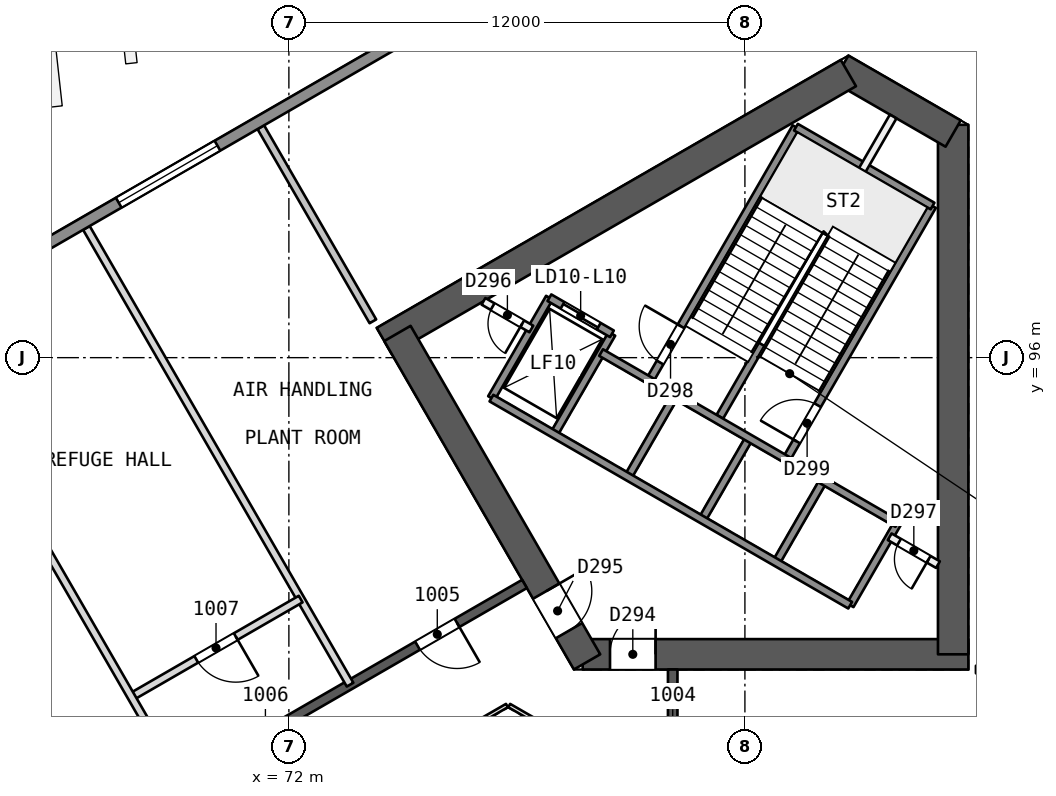
"""IFC4 building model, lengths in metres.
Left out: names, types, materials, properties, quantities, classifications, styles, units other than length and angle.
Written with IfcOpenShell. Run it as: python <this file> out.ifc"""

import sys

from ifc_helpers import new_model, si_unit, direction, frame, frame_2d, origin, place, context, subcontext, project, spatial, rectangle, extrude, element, fill, save


model = new_model("IFC4")
c1 = context("Model", 3, precision=1e-05, world=origin(), true_north=direction((0.0, 1.0)))
c2 = subcontext(c1, "Body", "Model", "MODEL_VIEW")
j1 = project(units=[si_unit("LENGTHUNIT", "METRE"), si_unit("PLANEANGLEUNIT", "RADIAN")], contexts=[c1])
p1 = place(None, origin())
s1 = spatial("IfcSite", under=j1, at=p1, CompositionType="ELEMENT")
p2 = place(p1, origin())
s2 = spatial("IfcBuilding", under=s1, at=p2, CompositionType="ELEMENT")
p3 = place(p2, frame((0.0, 0.0, 48.5)))
s3 = spatial("IfcBuildingStorey", under=s2, at=p3, CompositionType="ELEMENT", Elevation=48.5)
p4 = place(p3, frame((65.538, 80.0, 0.0), z_axis=(0.0, 0.0, 1.0), x_axis=(-0.49999662545, 0.866027352073, 0.0)))
e1 = element("IfcWall", 1, at=p4, inside=s3, PredefinedType="SHEAR", context=c2, shape_type="SweptSolid", body=[
    extrude(rectangle(XDim=10.149, YDim=0.8, at=frame_2d((5.074, 0.0))), origin(), (0.0, 0.0, 1.0), 4.4),
])
p5 = place(p4, frame((0.719, 0.0, 0.0)))
e2 = element("IfcOpeningElement", 2, at=p5, cuts=e1, PredefinedType="OPENING", context=c2, shape_type="SweptSolid", body=[
    extrude(rectangle(XDim=1.2, YDim=2.1, at=frame_2d((0.6, 1.05))), frame((0.0, 0.411, 0.0), z_axis=(0.0, -1.0, 0.0), x_axis=(1.0, 0.0, 0.0)), (0.0, 0.0, 1.0), 0.821),
])
p6 = place(p3, frame((79.731, 88.194, 0.0), z_axis=(0.0, 0.0, 1.0), x_axis=(1.0, 0.0, 0.0)))
e3 = element("IfcWall", 3, at=p6, inside=s3, PredefinedType="SHEAR", context=c2, shape_type="SweptSolid", body=[
    extrude(rectangle(XDim=10.149, YDim=0.8, at=frame_2d((5.074, 0.0))), origin(), (0.0, 0.0, 1.0), 4.4),
])
p7 = place(p6, frame((0.719, 0.0, 0.0)))
e4 = element("IfcOpeningElement", 4, at=p7, cuts=e3, PredefinedType="OPENING", context=c2, shape_type="SweptSolid", body=[
    extrude(rectangle(XDim=1.2, YDim=2.1, at=frame_2d((0.6, 1.05))), frame((0.0, 0.411, 0.0), z_axis=(0.0, -1.0, 0.0), x_axis=(1.0, 0.0, 0.0)), (0.0, 0.0, 1.0), 0.821),
])
p8 = place(p3, frame((89.48, 88.194, 0.0), z_axis=(0.0, 0.0, 1.0), x_axis=(0.0, 1.0, 0.0)))
e5 = element("IfcWall", 5, at=p8, inside=s3, PredefinedType="SHEAR", context=c2, shape_type="SweptSolid", body=[
    extrude(rectangle(XDim=13.933, YDim=0.8, at=frame_2d((6.967, 0.0))), origin(), (0.0, 0.0, 1.0), 4.4),
])
p9 = place(p3, frame((89.48, 101.897, 0.0), z_axis=(0.0, 0.0, 1.0), x_axis=(-0.866034355626, 0.499984494636, 0.0)))
e6 = element("IfcWall", 6, at=p9, inside=s3, PredefinedType="SHEAR", context=c2, shape_type="SweptSolid", body=[
    extrude(rectangle(XDim=3.414, YDim=0.8, at=frame_2d((1.707, 0.0))), origin(), (0.0, 0.0, 1.0), 4.4),
])
p10 = place(p3, frame((86.723, 103.488, 0.0), z_axis=(0.0, 0.0, 1.0), x_axis=(-0.866032504327, -0.499987701298, 0.0)))
e7 = element("IfcWall", 7, at=p10, inside=s3, PredefinedType="SHEAR", context=c2, shape_type="SweptSolid", body=[
    extrude(rectangle(XDim=14.102, YDim=0.8, at=frame_2d((7.051, 0.0))), origin(), (0.0, 0.0, 1.0), 4.4),
])
p11 = place(p3, frame((74.856, 96.637, 0.0), z_axis=(0.0, 0.0, 1.0), x_axis=(0.499993500917, -0.866029155999, 0.0)))
e8 = element("IfcWall", 8, at=p11, inside=s3, PredefinedType="SHEAR", context=c2, shape_type="SweptSolid", body=[
    extrude(rectangle(XDim=9.98, YDim=0.8, at=frame_2d((4.99, 0.0))), origin(), (0.0, 0.0, 1.0), 4.4),
])
p12 = place(p11, frame((7.83, 0.0, 0.0)))
e9 = element("IfcOpeningElement", 9, at=p12, cuts=e8, PredefinedType="OPENING", context=c2, shape_type="SweptSolid", body=[
    extrude(rectangle(XDim=1.2, YDim=2.1, at=frame_2d((0.6, 1.05))), frame((0.0, 0.411, 0.0), z_axis=(0.0, -1.0, 0.0), x_axis=(1.0, 0.0, 0.0)), (0.0, 0.0, 1.0), 0.821),
])
p13 = place(p3, frame((82.1, 72.206, 0.0), z_axis=(0.0, 0.0, 1.0), x_axis=(0.0, 1.0, 0.0)))
e10 = element("IfcWall", 10, at=p13, inside=s3, PredefinedType="SHEAR", context=c2, shape_type="SweptSolid", body=[
    extrude(rectangle(XDim=15.588, YDim=0.25, at=frame_2d((7.794, 0.0))), origin(), (0.0, 0.0, 1.0), 3.9),
])
p14 = place(p13, frame((3.297, 0.0, 0.0)))
e11 = element("IfcOpeningElement", 11, at=p14, cuts=e10, PredefinedType="OPENING", context=c2, shape_type="SweptSolid", body=[
    extrude(rectangle(XDim=1.2, YDim=2.4, at=frame_2d((0.6, 1.2))), frame((0.0, 0.135, 0.0), z_axis=(0.0, -1.0, 0.0), x_axis=(1.0, 0.0, 0.0)), (0.0, 0.0, 1.0), 0.271),
])
p15 = place(p13, frame((9.143, 0.0, 0.0)))
e12 = element("IfcOpeningElement", 12, at=p15, cuts=e10, PredefinedType="OPENING", context=c2, shape_type="SweptSolid", body=[
    extrude(rectangle(XDim=1.2, YDim=2.4, at=frame_2d((0.6, 1.2))), frame((0.0, 0.135, 0.0), z_axis=(0.0, -1.0, 0.0), x_axis=(1.0, 0.0, 0.0)), (0.0, 0.0, 1.0), 0.271),
])
p16 = place(p13, frame((13.04, 0.0, 0.0)))
e13 = element("IfcOpeningElement", 13, at=p16, cuts=e10, PredefinedType="OPENING", context=c2, shape_type="SweptSolid", body=[
    extrude(rectangle(XDim=1.2, YDim=2.4, at=frame_2d((0.6, 1.2))), frame((0.0, 0.135, 0.0), z_axis=(0.0, -1.0, 0.0), x_axis=(1.0, 0.0, 0.0)), (0.0, 0.0, 1.0), 0.271),
])
p17 = place(p3, frame((78.2, 90.046, 0.0), z_axis=(0.0, 0.0, 1.0), x_axis=(-0.866026492143, -0.499998114903, 0.0)))
e14 = element("IfcWall", 14, at=p17, inside=s3, PredefinedType="SHEAR", context=c2, shape_type="SweptSolid", body=[
    extrude(rectangle(XDim=15.588, YDim=0.25, at=frame_2d((7.794, 0.0))), origin(), (0.0, 0.0, 1.0), 3.9),
])
p18 = place(p17, frame((2.05, 0.0, 0.0)))
e15 = element("IfcOpeningElement", 15, at=p18, cuts=e14, PredefinedType="OPENING", context=c2, shape_type="SweptSolid", body=[
    extrude(rectangle(XDim=1.2, YDim=2.4, at=frame_2d((0.6, 1.2))), frame((0.0, 0.135, 0.0), z_axis=(0.0, -1.0, 0.0), x_axis=(1.0, 0.0, 0.0)), (0.0, 0.0, 1.0), 0.271),
])
p19 = place(p17, frame((7.272, 0.0, 0.0)))
e16 = element("IfcOpeningElement", 16, at=p19, cuts=e14, PredefinedType="OPENING", context=c2, shape_type="SweptSolid", body=[
    extrude(rectangle(XDim=1.2, YDim=2.4, at=frame_2d((0.6, 1.2))), frame((0.0, 0.135, 0.0), z_axis=(0.0, -1.0, 0.0), x_axis=(1.0, 0.0, 0.0)), (0.0, 0.0, 1.0), 0.271),
])
p20 = place(p17, frame((12.417, 0.0, 0.0)))
e17 = element("IfcOpeningElement", 17, at=p20, cuts=e14, PredefinedType="OPENING", context=c2, shape_type="SweptSolid", body=[
    extrude(rectangle(XDim=1.2, YDim=2.4, at=frame_2d((0.6, 1.2))), frame((0.0, 0.135, 0.0), z_axis=(0.0, -1.0, 0.0), x_axis=(1.0, 0.0, 0.0)), (0.0, 0.0, 1.0), 0.271),
])
p21 = place(p3, frame((90.079, 87.794, 0.0), z_axis=(0.0, 0.0, 1.0), x_axis=(1.0, 0.0, 0.0)))
e18 = element("IfcWall", 18, at=p21, inside=s3, PredefinedType="PARTITIONING", context=c2, shape_type="SweptSolid", body=[
    extrude(rectangle(XDim=5.898, YDim=0.2, at=frame_2d((2.949, 0.0))), origin(), (0.0, 0.0, 1.0), 3.9),
])
p22 = place(p21, frame((2.349, 0.0, 0.0)))
e19 = element("IfcOpeningElement", 19, at=p22, cuts=e18, PredefinedType="OPENING", context=c2, shape_type="SweptSolid", body=[
    extrude(rectangle(XDim=1.2, YDim=2.4, at=frame_2d((0.6, 1.2))), frame((0.0, 0.11, 0.0), z_axis=(0.0, -1.0, 0.0), x_axis=(1.0, 0.0, 0.0)), (0.0, 0.0, 1.0), 0.221),
])
p23 = place(p3, frame((66.671, 99.414, 0.0), z_axis=(0.0, 0.0, 1.0), x_axis=(0.500010269051, -0.866019474864, 0.0)))
e20 = element("IfcWall", 20, at=p23, inside=s3, PredefinedType="PARTITIONING", context=c2, shape_type="SweptSolid", body=[
    extrude(rectangle(XDim=13.878, YDim=0.2, at=frame_2d((6.939, 0.0))), origin(), (0.0, 0.0, 1.0), 3.9),
])
p24 = place(p3, frame((71.261, 102.064, 0.0), z_axis=(0.0, 0.0, 1.0), x_axis=(0.499985191823, -0.866033953121, 0.0)))
e21 = element("IfcWall", 21, at=p24, inside=s3, PredefinedType="PARTITIONING", context=c2, shape_type="SweptSolid", body=[
    extrude(rectangle(XDim=5.899, YDim=0.2, at=frame_2d((2.949, 0.0))), origin(), (0.0, 0.0, 1.0), 3.9),
])
p25 = place(p3, frame((72.31, 89.647, 0.0), z_axis=(0.0, 0.0, 1.0), x_axis=(-0.866035426308, -0.499982640079, 0.0)))
e22 = element("IfcWall", 22, at=p25, inside=s3, PredefinedType="PARTITIONING", context=c2, shape_type="SweptSolid", body=[
    extrude(rectangle(XDim=5.144, YDim=0.2, at=frame_2d((2.572, 0.0))), origin(), (0.0, 0.0, 1.0), 3.9),
])
p26 = place(p25, frame((1.972, 0.0, 0.0)))
e23 = element("IfcOpeningElement", 23, at=p26, cuts=e22, PredefinedType="OPENING", context=c2, shape_type="SweptSolid", body=[
    extrude(rectangle(XDim=1.2, YDim=2.4, at=frame_2d((0.6, 1.2))), frame((0.0, 0.11, 0.0), z_axis=(0.0, -1.0, 0.0), x_axis=(1.0, 0.0, 0.0)), (0.0, 0.0, 1.0), 0.221),
])
p27 = place(p3, frame((62.216, 96.842, 0.0), z_axis=(0.0, 0.0, 1.0), x_axis=(0.499997074782, -0.866027092653, 0.0)))
e24 = element("IfcWall", 24, at=p27, inside=s3, PredefinedType="PARTITIONING", context=c2, shape_type="SweptSolid", body=[
    extrude(rectangle(XDim=13.877, YDim=0.2, at=frame_2d((6.939, 0.0))), origin(), (0.0, 0.0, 1.0), 3.9),
])
p28 = place(p3, frame((38.131, 83.108, 0.0), z_axis=(0.0, 0.0, 1.0), x_axis=(0.866025105017, 0.50000051748, 0.0)))
e25 = element("IfcWall", 25, at=p28, inside=s3, PredefinedType="SOLIDWALL", context=c2, shape_type="SweptSolid", body=[
    extrude(rectangle(XDim=60.751, YDim=0.3, at=frame_2d((30.375, 0.0))), origin(), (0.0, 0.0, 1.0), 3.9),
])
p29 = place(p28, frame((3.562, 0.0, 0.6)))
e26 = element("IfcOpeningElement", 26, at=p29, cuts=e25, PredefinedType="OPENING", context=c2, shape_type="SweptSolid", body=[
    extrude(rectangle(XDim=3.0, YDim=2.4, at=frame_2d((1.5, 1.2))), frame((0.0, 0.161, 0.0), z_axis=(0.0, -1.0, 0.0), x_axis=(1.0, 0.0, 0.0)), (0.0, 0.0, 1.0), 0.321),
])
p30 = place(p28, frame((13.688, 0.0, 0.6)))
e27 = element("IfcOpeningElement", 27, at=p30, cuts=e25, PredefinedType="OPENING", context=c2, shape_type="SweptSolid", body=[
    extrude(rectangle(XDim=3.0, YDim=2.4, at=frame_2d((1.5, 1.2))), frame((0.0, 0.161, 0.0), z_axis=(0.0, -1.0, 0.0), x_axis=(1.0, 0.0, 0.0)), (0.0, 0.0, 1.0), 0.321),
])
p31 = place(p28, frame((23.813, 0.0, 0.6)))
e28 = element("IfcOpeningElement", 28, at=p31, cuts=e25, PredefinedType="OPENING", context=c2, shape_type="SweptSolid", body=[
    extrude(rectangle(XDim=3.0, YDim=2.4, at=frame_2d((1.5, 1.2))), frame((0.0, 0.161, 0.0), z_axis=(0.0, -1.0, 0.0), x_axis=(1.0, 0.0, 0.0)), (0.0, 0.0, 1.0), 0.321),
])
p32 = place(p28, frame((33.938, 0.0, 0.6)))
e29 = element("IfcOpeningElement", 29, at=p32, cuts=e25, PredefinedType="OPENING", context=c2, shape_type="SweptSolid", body=[
    extrude(rectangle(XDim=3.0, YDim=2.4, at=frame_2d((1.5, 1.2))), frame((0.0, 0.161, 0.0), z_axis=(0.0, -1.0, 0.0), x_axis=(1.0, 0.0, 0.0)), (0.0, 0.0, 1.0), 0.321),
])
p33 = place(p28, frame((44.063, 0.0, 0.6)))
e30 = element("IfcOpeningElement", 30, at=p33, cuts=e25, PredefinedType="OPENING", context=c2, shape_type="SweptSolid", body=[
    extrude(rectangle(XDim=3.0, YDim=2.4, at=frame_2d((1.5, 1.2))), frame((0.0, 0.161, 0.0), z_axis=(0.0, -1.0, 0.0), x_axis=(1.0, 0.0, 0.0)), (0.0, 0.0, 1.0), 0.321),
])
p34 = place(p28, frame((54.188, 0.0, 0.6)))
e31 = element("IfcOpeningElement", 31, at=p34, cuts=e25, PredefinedType="OPENING", context=c2, shape_type="SweptSolid", body=[
    extrude(rectangle(XDim=3.0, YDim=2.4, at=frame_2d((1.5, 1.2))), frame((0.0, 0.161, 0.0), z_axis=(0.0, -1.0, 0.0), x_axis=(1.0, 0.0, 0.0)), (0.0, 0.0, 1.0), 0.321),
])
for number, where, z_axis, x_axis in (
    (32, (86.77, 89.486, 0.0), (0.0, 0.0, 1.0), (0.5, 0.866, 0.0)),
    (33, (84.821, 90.611, 0.0), (0.0, 0.0, 1.0), (0.5, 0.866, 0.0)),
):
    element("IfcWall", number, at=place(p3, frame(where, z_axis=z_axis, x_axis=x_axis)), inside=s3, PredefinedType="SOLIDWALL", context=c2, shape_type="SweptSolid", body=[
        extrude(rectangle(XDim=2.48, YDim=0.2, at=frame_2d((1.24, 0.0))), origin(), (0.0, 0.0, 1.0), 3.9),
    ])
p35 = place(p3, frame((85.087, 93.321, 0.0), z_axis=(0.0, 0.0, 1.0), x_axis=(0.500019787375, 0.866013979237, 0.0)))
e34 = element("IfcWall", 34, at=p35, inside=s3, PredefinedType="SOLIDWALL", context=c2, shape_type="SweptSolid", body=[
    extrude(rectangle(XDim=7.7, YDim=0.2, at=frame_2d((3.85, 0.0))), origin(), (0.0, 0.0, 1.0), 3.9),
])
p36 = place(p35, frame((0.55, 0.0, 0.0)))
e35 = element("IfcOpeningElement", 35, at=p36, cuts=e34, PredefinedType="OPENING", context=c2, shape_type="SweptSolid", body=[
    extrude(rectangle(XDim=1.1, YDim=2.1, at=frame_2d((0.55, 1.05))), frame((0.0, 0.11, 0.0), z_axis=(0.0, -1.0, 0.0), x_axis=(1.0, 0.0, 0.0)), (0.0, 0.0, 1.0), 0.221),
])
p37 = place(p3, frame((82.873, 91.736, 0.0), z_axis=(0.0, 0.0, 1.0), x_axis=(0.499961042966, 0.86604789447, 0.0)))
e36 = element("IfcWall", 36, at=p37, inside=s3, PredefinedType="SOLIDWALL", context=c2, shape_type="SweptSolid", body=[
    extrude(rectangle(XDim=2.48, YDim=0.2, at=frame_2d((1.24, 0.0))), origin(), (0.0, 0.0, 1.0), 3.9),
])
p38 = place(p3, frame((83.34, 94.445, 0.0), z_axis=(0.0, 0.0, 1.0), x_axis=(0.499946605688, 0.86605622881, 0.0)))
e37 = element("IfcWall", 37, at=p38, inside=s3, PredefinedType="SOLIDWALL", context=c2, shape_type="SweptSolid", body=[
    extrude(rectangle(XDim=2.2, YDim=0.2, at=frame_2d((1.1, 0.0))), origin(), (0.0, 0.0, 1.0), 3.9),
])
p39 = place(p3, frame((87.09, 100.94, 0.0), z_axis=(0.0, 0.0, 1.0), x_axis=(0.499956811548, 0.866050337213, 0.0)))
e38 = element("IfcWall", 38, at=p39, inside=s3, PredefinedType="PARTITIONING", context=c2, shape_type="SweptSolid", body=[
    extrude(rectangle(XDim=1.623, YDim=0.2, at=frame_2d((0.812, 0.0))), origin(), (0.0, 0.0, 1.0), 3.9),
])
p40 = place(p3, frame((80.924, 92.861, 0.0), z_axis=(0.0, 0.0, 1.0), x_axis=(0.499961042966, 0.86604789447, 0.0)))
e39 = element("IfcWall", 39, at=p40, inside=s3, PredefinedType="SOLIDWALL", context=c2, shape_type="SweptSolid", body=[
    extrude(rectangle(XDim=2.48, YDim=0.2, at=frame_2d((1.24, 0.0))), origin(), (0.0, 0.0, 1.0), 3.9),
])
p41 = place(p3, frame((81.493, 95.396, 0.0), z_axis=(0.0, 0.0, 1.0), x_axis=(0.500006057782, 0.866021906294, 0.0)))
e40 = element("IfcWall", 40, at=p41, inside=s3, PredefinedType="SOLIDWALL", context=c2, shape_type="SweptSolid", body=[
    extrude(rectangle(XDim=7.7, YDim=0.2, at=frame_2d((3.85, 0.0))), origin(), (0.0, 0.0, 1.0), 3.9),
])
p42 = place(p41, frame((0.55, 0.0, 0.0)))
e41 = element("IfcOpeningElement", 41, at=p42, cuts=e40, PredefinedType="OPENING", context=c2, shape_type="SweptSolid", body=[
    extrude(rectangle(XDim=1.1, YDim=2.1, at=frame_2d((0.55, 1.05))), frame((0.0, 0.11, 0.0), z_axis=(0.0, -1.0, 0.0), x_axis=(1.0, 0.0, 0.0)), (0.0, 0.0, 1.0), 0.221),
])
for number, where, z_axis, x_axis in (
    (42, (78.976, 93.986, 0.0), (0.0, 0.0, 1.0), (0.5, 0.866, 0.0)),
    (43, (77.33, 94.936, 0.0), (0.0, 0.0, 1.0), (0.5, 0.866, 0.0)),
):
    element("IfcWall", number, at=place(p3, frame(where, z_axis=z_axis, x_axis=x_axis)), inside=s3, PredefinedType="SOLIDWALL", context=c2, shape_type="SweptSolid", body=[
        extrude(rectangle(XDim=3.05, YDim=0.2, at=frame_2d((1.525, 0.0))), origin(), (0.0, 0.0, 1.0), 3.9),
    ])
p43 = place(p3, frame((86.77, 89.486, 0.0), z_axis=(0.0, 0.0, 1.0), x_axis=(-0.86601811187, 0.500012629753, 0.0)))
e44 = element("IfcWall", 44, at=p43, inside=s3, PredefinedType="SOLIDWALL", context=c2, shape_type="SweptSolid", body=[
    extrude(rectangle(XDim=10.9, YDim=0.2, at=frame_2d((5.45, 0.0))), origin(), (0.0, 0.0, 1.0), 3.9),
])
p44 = place(p3, frame((89.08, 90.554, 0.0), z_axis=(0.0, 0.0, 1.0), x_axis=(-0.866022048785, 0.500005810984, 0.0)))
e45 = element("IfcWall", 45, at=p44, inside=s3, PredefinedType="PARTITIONING", context=c2, shape_type="SweptSolid", body=[
    extrude(rectangle(XDim=1.467, YDim=0.2, at=frame_2d((0.733, 0.0))), origin(), (0.0, 0.0, 1.0), 3.9),
])
p45 = place(p44, frame((0.283, 0.0, 0.0)))
e46 = element("IfcOpeningElement", 46, at=p45, cuts=e45, PredefinedType="OPENING", context=c2, shape_type="SweptSolid", body=[
    extrude(rectangle(XDim=0.9, YDim=2.1, at=frame_2d((0.45, 1.05))), frame((0.0, 0.11, 0.0), z_axis=(0.0, -1.0, 0.0), x_axis=(1.0, 0.0, 0.0)), (0.0, 0.0, 1.0), 0.221),
])
p46 = place(p3, frame((78.38, 96.755, 0.0), z_axis=(0.0, 0.0, 1.0), x_axis=(-0.866003949776, 0.500037157592, 0.0)))
e47 = element("IfcWall", 47, at=p46, inside=s3, PredefinedType="PARTITIONING", context=c2, shape_type="SweptSolid", body=[
    extrude(rectangle(XDim=1.455, YDim=0.2, at=frame_2d((0.728, 0.0))), origin(), (0.0, 0.0, 1.0), 3.9),
])
p47 = place(p46, frame((0.278, 0.0, 0.0)))
e48 = element("IfcOpeningElement", 48, at=p47, cuts=e47, PredefinedType="OPENING", context=c2, shape_type="SweptSolid", body=[
    extrude(rectangle(XDim=0.9, YDim=2.1, at=frame_2d((0.45, 1.05))), frame((0.0, 0.11, 0.0), z_axis=(0.0, -1.0, 0.0), x_axis=(1.0, 0.0, 0.0)), (0.0, 0.0, 1.0), 0.221),
])
p48 = place(p3, frame((88.01, 91.634, 0.0), z_axis=(0.0, 0.0, 1.0), x_axis=(-0.866024315419, 0.5000018851, 0.0)))
e49 = element("IfcWall", 49, at=p48, inside=s3, PredefinedType="SOLIDWALL", context=c2, shape_type="SweptSolid", body=[
    extrude(rectangle(XDim=9.0, YDim=0.2, at=frame_2d((4.5, 0.0))), origin(), (0.0, 0.0, 1.0), 3.9),
])
p49 = place(p3, frame((80.5, 96.627, 0.0), z_axis=(0.0, 0.0, 1.0), x_axis=(-0.86601224135, 0.500022797313, 0.0)))
e50 = element("IfcWall", 50, at=p49, inside=s3, PredefinedType="SOLIDWALL", context=c2, shape_type="SweptSolid", body=[
    extrude(rectangle(XDim=1.9, YDim=0.2, at=frame_2d((0.95, 0.0))), origin(), (0.0, 0.0, 1.0), 3.9),
])
p50 = place(p49, frame((0.4, 0.0, 0.0)))
e51 = element("IfcOpeningElement", 51, at=p50, cuts=e50, PredefinedType="OPENING", context=c2, shape_type="SweptSolid", body=[
    extrude(rectangle(XDim=1.1, YDim=2.1, at=frame_2d((0.55, 1.05))), frame((0.0, 0.11, 0.0), z_axis=(0.0, -1.0, 0.0), x_axis=(1.0, 0.0, 0.0)), (0.0, 0.0, 1.0), 0.221),
])
p51 = place(p3, frame((88.937, 99.99, 0.0), z_axis=(0.0, 0.0, 1.0), x_axis=(-0.866004344652, 0.500036473714, 0.0)))
e52 = element("IfcWall", 52, at=p51, inside=s3, PredefinedType="SOLIDWALL", context=c2, shape_type="SweptSolid", body=[
    extrude(rectangle(XDim=4.15, YDim=0.2, at=frame_2d((2.075, 0.0))), origin(), (0.0, 0.0, 1.0), 3.9),
])
p52 = place(p3, frame((79.53, 85.846, 0.0), z_axis=(0.0, 0.0, 1.0), x_axis=(-0.866041268327, 0.499972520799, 0.0)))
e53 = element("IfcWall", 53, at=p52, inside=s3, PredefinedType="PARTITIONING", context=c2, shape_type="SweptSolid", body=[
    extrude(rectangle(XDim=2.0, YDim=0.1, at=frame_2d((1.0, 0.0))), origin(), (0.0, 0.0, 1.0), 3.9),
])
p53 = place(p3, frame((77.738, 86.846, 0.0), z_axis=(0.0, 0.0, 1.0), x_axis=(-0.866026658274, -0.499997827154, 0.0)))
e54 = element("IfcWall", 54, at=p53, inside=s3, PredefinedType="PARTITIONING", context=c2, shape_type="SweptSolid", body=[
    extrude(rectangle(XDim=11.588, YDim=0.1, at=frame_2d((5.794, 0.0))), origin(), (0.0, 0.0, 1.0), 3.9),
])
p54 = place(p18, origin())
e55 = element("IfcDoor", 55, at=p54, inside=s3, OperationType="SINGLE_SWING_LEFT", PredefinedType="NOTDEFINED", context=c2, shape_type="SweptSolid", body=[
    extrude(rectangle(XDim=1.2, YDim=2.4, at=frame_2d((0.6, 1.2))), frame((0.0, 0.025, 0.0), z_axis=(0.0, -1.0, 0.0), x_axis=(1.0, 0.0, 0.0)), (0.0, 0.0, 1.0), 0.05),
])
fill(e15, e55)
p55 = place(p26, origin())
e56 = element("IfcDoor", 56, at=p55, inside=s3, OperationType="SINGLE_SWING_LEFT", PredefinedType="NOTDEFINED", context=c2, shape_type="SweptSolid", body=[
    extrude(rectangle(XDim=1.2, YDim=2.4, at=frame_2d((0.6, 1.2))), frame((0.0, 0.025, 0.0), z_axis=(0.0, -1.0, 0.0), x_axis=(1.0, 0.0, 0.0)), (0.0, 0.0, 1.0), 0.05),
])
fill(e23, e56)
p56 = place(p32, origin())
e57 = element("IfcWindow", 57, at=p56, inside=s3, PartitioningType="SINGLE_PANEL", PredefinedType="WINDOW", context=c2, shape_type="SweptSolid", body=[
    extrude(rectangle(XDim=3.0, YDim=2.4, at=frame_2d((1.5, 1.2))), frame((0.0, 0.03, 0.0), z_axis=(0.0, -1.0, 0.0), x_axis=(1.0, 0.0, 0.0)), (0.0, 0.0, 1.0), 0.06),
])
fill(e29, e57)
p57 = place(p7, origin())
e58 = element("IfcDoor", 58, at=p57, inside=s3, OperationType="SINGLE_SWING_RIGHT", PredefinedType="NOTDEFINED", context=c2, shape_type="SweptSolid", body=[
    extrude(rectangle(XDim=1.2, YDim=2.1, at=frame_2d((0.6, 1.05))), frame((0.0, 0.025, 0.0), z_axis=(0.0, -1.0, 0.0), x_axis=(1.0, 0.0, 0.0)), (0.0, 0.0, 1.0), 0.05),
])
fill(e4, e58)
p58 = place(p12, origin())
e59 = element("IfcDoor", 59, at=p58, inside=s3, OperationType="SINGLE_SWING_LEFT", PredefinedType="NOTDEFINED", context=c2, shape_type="SweptSolid", body=[
    extrude(rectangle(XDim=1.2, YDim=2.1, at=frame_2d((0.6, 1.05))), frame((0.0, 0.025, 0.0), z_axis=(0.0, -1.0, 0.0), x_axis=(1.0, 0.0, 0.0)), (0.0, 0.0, 1.0), 0.05),
])
fill(e9, e59)
p59 = place(p50, origin())
e60 = element("IfcDoor", 60, at=p59, inside=s3, OperationType="SLIDING_TO_RIGHT", PredefinedType="NOTDEFINED", context=c2, shape_type="SweptSolid", body=[
    extrude(rectangle(XDim=1.1, YDim=2.1, at=frame_2d((0.55, 1.05))), frame((0.0, 0.025, 0.0), z_axis=(0.0, -1.0, 0.0), x_axis=(1.0, 0.0, 0.0)), (0.0, 0.0, 1.0), 0.05),
])
fill(e51, e60)
p60 = place(p47, origin())
e61 = element("IfcDoor", 61, at=p60, inside=s3, OperationType="SINGLE_SWING_LEFT", PredefinedType="NOTDEFINED", context=c2, shape_type="SweptSolid", body=[
    extrude(rectangle(XDim=0.9, YDim=2.1, at=frame_2d((0.45, 1.05))), frame((0.0, 0.025, 0.0), z_axis=(0.0, -1.0, 0.0), x_axis=(1.0, 0.0, 0.0)), (0.0, 0.0, 1.0), 0.05),
])
fill(e48, e61)
p61 = place(p45, origin())
e62 = element("IfcDoor", 62, at=p61, inside=s3, OperationType="SINGLE_SWING_LEFT", PredefinedType="NOTDEFINED", context=c2, shape_type="SweptSolid", body=[
    extrude(rectangle(XDim=0.9, YDim=2.1, at=frame_2d((0.45, 1.05))), frame((0.0, 0.025, 0.0), z_axis=(0.0, -1.0, 0.0), x_axis=(1.0, 0.0, 0.0)), (0.0, 0.0, 1.0), 0.05),
])
fill(e46, e62)
p62 = place(p42, origin())
e63 = element("IfcDoor", 63, at=p62, inside=s3, OperationType="SINGLE_SWING_RIGHT", PredefinedType="NOTDEFINED", context=c2, shape_type="SweptSolid", body=[
    extrude(rectangle(XDim=1.1, YDim=2.1, at=frame_2d((0.55, 1.05))), frame((0.0, 0.025, 0.0), z_axis=(0.0, -1.0, 0.0), x_axis=(1.0, 0.0, 0.0)), (0.0, 0.0, 1.0), 0.05),
])
fill(e41, e63)
p63 = place(p36, origin())
e64 = element("IfcDoor", 64, at=p63, inside=s3, OperationType="SINGLE_SWING_LEFT", PredefinedType="NOTDEFINED", context=c2, shape_type="SweptSolid", body=[
    extrude(rectangle(XDim=1.1, YDim=2.1, at=frame_2d((0.55, 1.05))), frame((0.0, 0.025, 0.0), z_axis=(0.0, -1.0, 0.0), x_axis=(1.0, 0.0, 0.0)), (0.0, 0.0, 1.0), 0.05),
])
fill(e35, e64)
save(model, sys.argv[1])
